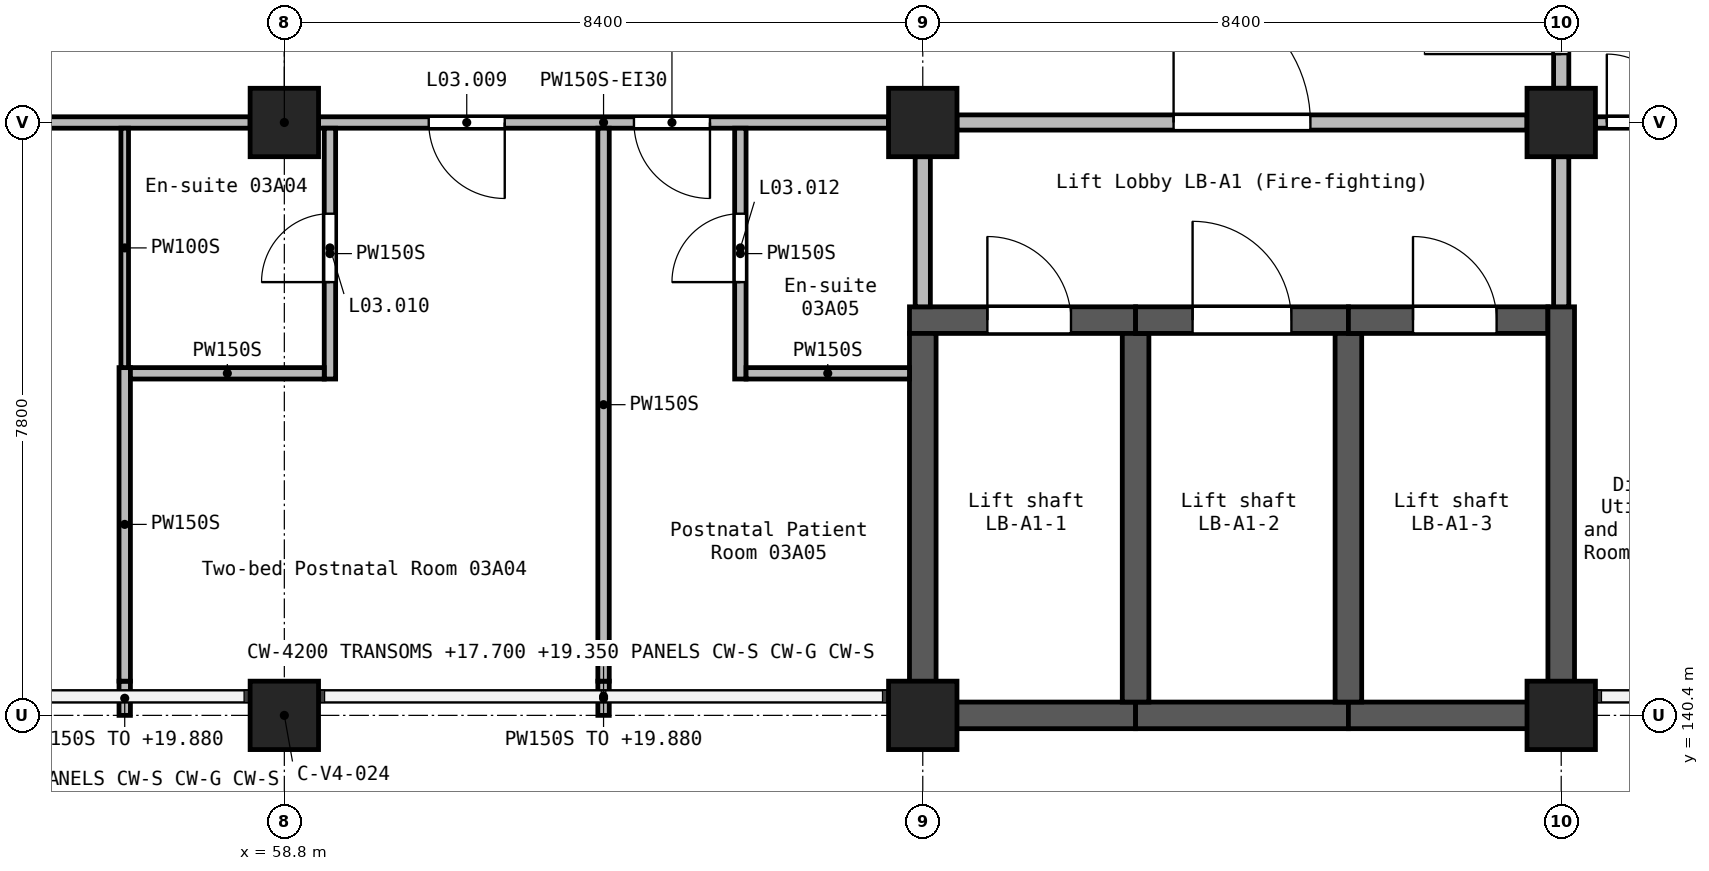
"""IFC4 building model, lengths in metres.
Left out: names, types, materials, properties, quantities, classifications, styles, units other than length and angle.
Written with IfcOpenShell. Run it as: python <this file> out.ifc"""

import sys

from ifc_helpers import new_model, si_unit, direction, frame, frame_2d, origin, origin_2d, place, context, subcontext, project, spatial, rectangle, extrude, element, fill, save


model = new_model("IFC4")
c1 = context("Model", 3, precision=1e-05, world=origin(), true_north=direction((0.0, 1.0)))
c2 = subcontext(c1, "Body", "Model", "MODEL_VIEW")
j1 = project(units=[si_unit("LENGTHUNIT", "METRE"), si_unit("PLANEANGLEUNIT", "RADIAN")], contexts=[c1])
p1 = place(None, origin())
s1 = spatial("IfcSite", under=j1, at=p1, CompositionType="ELEMENT")
p2 = place(p1, origin())
s2 = spatial("IfcBuilding", under=s1, at=p2, CompositionType="ELEMENT")
p3 = place(p2, frame((0.0, 0.0, 16.8)))
s3 = spatial("IfcBuildingStorey", under=s2, at=p3, CompositionType="ELEMENT", Elevation=16.8)
for number, where, z_axis, x_axis in (
    (1, (58.8, 140.4, 0.0), (0.0, 0.0, 1.0), (1.0, 0.0, 0.0)),
    (2, (58.8, 148.2, 0.0), (0.0, 0.0, 1.0), (1.0, 0.0, 0.0)),
    (3, (67.2, 140.4, 0.0), (0.0, 0.0, 1.0), (1.0, 0.0, 0.0)),
    (4, (67.2, 148.2, 0.0), (0.0, 0.0, 1.0), (1.0, 0.0, 0.0)),
    (5, (75.6, 140.4, 0.0), (0.0, 0.0, 1.0), (1.0, 0.0, 0.0)),
    (6, (75.6, 148.2, 0.0), (0.0, 0.0, 1.0), (1.0, 0.0, 0.0)),
):
    element("IfcColumn", number, at=place(p3, frame(where, z_axis=z_axis, x_axis=x_axis)), inside=s3, PredefinedType="COLUMN", context=c2, shape_type="SweptSolid", body=[
        extrude(rectangle(XDim=0.9, YDim=0.9, at=origin_2d()), origin(), (0.0, 0.0, 1.0), 4.2),
    ])
p4 = place(p3, frame((67.025, 145.6, 0.0), z_axis=(0.0, 0.0, 1.0), x_axis=(1.0, 0.0, 0.0)))
e7 = element("IfcWall", 7, at=p4, inside=s3, PredefinedType="SHEAR", context=c2, shape_type="SweptSolid", body=[
    extrude(rectangle(XDim=2.975, YDim=0.35, at=frame_2d((1.488, 0.0))), origin(), (0.0, 0.0, 1.0), 4.2),
])
p5 = place(p4, frame((1.025, 0.0, 0.0)))
e8 = element("IfcOpeningElement", 8, at=p5, cuts=e7, PredefinedType="OPENING", context=c2, shape_type="SweptSolid", body=[
    extrude(rectangle(XDim=1.1, YDim=2.1, at=frame_2d((0.55, 1.05))), frame((0.0, 0.185, 0.0), z_axis=(0.0, -1.0, 0.0), x_axis=(1.0, 0.0, 0.0)), (0.0, 0.0, 1.0), 0.37),
])
p6 = place(p3, frame((67.2, 140.225, 0.0), z_axis=(0.0, 0.0, 1.0), x_axis=(0.0, 1.0, 0.0)))
e9 = element("IfcWall", 9, at=p6, inside=s3, PredefinedType="SHEAR", context=c2, shape_type="SweptSolid", body=[
    extrude(rectangle(XDim=5.2, YDim=0.35, at=frame_2d((2.6, 0.0))), origin(), (0.0, 0.0, 1.0), 4.2),
])
p7 = place(p3, frame((67.375, 140.4, 0.0), z_axis=(0.0, 0.0, 1.0), x_axis=(1.0, 0.0, 0.0)))
e10 = element("IfcWall", 10, at=p7, inside=s3, PredefinedType="SHEAR", context=c2, shape_type="SweptSolid", body=[
    extrude(rectangle(XDim=2.625, YDim=0.35, at=frame_2d((1.312, 0.0))), origin(), (0.0, 0.0, 1.0), 4.2),
])
p8 = place(p3, frame((70.0, 140.4, 0.0), z_axis=(0.0, 0.0, 1.0), x_axis=(1.0, 0.0, 0.0)))
e11 = element("IfcWall", 11, at=p8, inside=s3, PredefinedType="SHEAR", context=c2, shape_type="SweptSolid", body=[
    extrude(rectangle(XDim=2.8, YDim=0.35, at=frame_2d((1.4, 0.0))), origin(), (0.0, 0.0, 1.0), 4.2),
])
p9 = place(p3, frame((70.0, 140.575, 0.0), z_axis=(0.0, 0.0, 1.0), x_axis=(0.0, 1.0, 0.0)))
e12 = element("IfcWall", 12, at=p9, inside=s3, PredefinedType="SHEAR", context=c2, shape_type="SweptSolid", body=[
    extrude(rectangle(XDim=4.85, YDim=0.35, at=frame_2d((2.425, 0.0))), origin(), (0.0, 0.0, 1.0), 4.2),
])
p10 = place(p3, frame((70.0, 145.6, 0.0), z_axis=(0.0, 0.0, 1.0), x_axis=(1.0, 0.0, 0.0)))
e13 = element("IfcWall", 13, at=p10, inside=s3, PredefinedType="SHEAR", context=c2, shape_type="SweptSolid", body=[
    extrude(rectangle(XDim=2.8, YDim=0.35, at=frame_2d((1.4, 0.0))), origin(), (0.0, 0.0, 1.0), 4.2),
])
p11 = place(p10, frame((0.75, 0.0, 0.0)))
e14 = element("IfcOpeningElement", 14, at=p11, cuts=e13, PredefinedType="OPENING", context=c2, shape_type="SweptSolid", body=[
    extrude(rectangle(XDim=1.3, YDim=2.1, at=frame_2d((0.65, 1.05))), frame((0.0, 0.185, 0.0), z_axis=(0.0, -1.0, 0.0), x_axis=(1.0, 0.0, 0.0)), (0.0, 0.0, 1.0), 0.37),
])
p12 = place(p3, frame((72.8, 140.4, 0.0), z_axis=(0.0, 0.0, 1.0), x_axis=(1.0, 0.0, 0.0)))
e15 = element("IfcWall", 15, at=p12, inside=s3, PredefinedType="SHEAR", context=c2, shape_type="SweptSolid", body=[
    extrude(rectangle(XDim=2.625, YDim=0.35, at=frame_2d((1.312, 0.0))), origin(), (0.0, 0.0, 1.0), 4.2),
])
p13 = place(p3, frame((72.8, 140.575, 0.0), z_axis=(0.0, 0.0, 1.0), x_axis=(0.0, 1.0, 0.0)))
e16 = element("IfcWall", 16, at=p13, inside=s3, PredefinedType="SHEAR", context=c2, shape_type="SweptSolid", body=[
    extrude(rectangle(XDim=4.85, YDim=0.35, at=frame_2d((2.425, 0.0))), origin(), (0.0, 0.0, 1.0), 4.2),
])
p14 = place(p3, frame((72.8, 145.6, 0.0), z_axis=(0.0, 0.0, 1.0), x_axis=(1.0, 0.0, 0.0)))
e17 = element("IfcWall", 17, at=p14, inside=s3, PredefinedType="SHEAR", context=c2, shape_type="SweptSolid", body=[
    extrude(rectangle(XDim=2.625, YDim=0.35, at=frame_2d((1.312, 0.0))), origin(), (0.0, 0.0, 1.0), 4.2),
])
p15 = place(p14, frame((0.85, 0.0, 0.0)))
e18 = element("IfcOpeningElement", 18, at=p15, cuts=e17, PredefinedType="OPENING", context=c2, shape_type="SweptSolid", body=[
    extrude(rectangle(XDim=1.1, YDim=2.1, at=frame_2d((0.55, 1.05))), frame((0.0, 0.185, 0.0), z_axis=(0.0, -1.0, 0.0), x_axis=(1.0, 0.0, 0.0)), (0.0, 0.0, 1.0), 0.37),
])
p16 = place(p3, frame((75.6, 140.225, 0.0), z_axis=(0.0, 0.0, 1.0), x_axis=(0.0, 1.0, 0.0)))
e19 = element("IfcWall", 19, at=p16, inside=s3, PredefinedType="SHEAR", context=c2, shape_type="SweptSolid", body=[
    extrude(rectangle(XDim=5.55, YDim=0.35, at=frame_2d((2.775, 0.0))), origin(), (0.0, 0.0, 1.0), 4.2),
])
p17 = place(p3, frame((75.6, 145.775, 0.0), z_axis=(0.0, 0.0, 1.0), x_axis=(0.0, 1.0, 0.0)))
e20 = element("IfcWall", 20, at=p17, inside=s3, PredefinedType="SOLIDWALL", context=c2, shape_type="SweptSolid", body=[
    extrude(rectangle(XDim=1.975, YDim=0.2, at=frame_2d((0.988, 0.0))), origin(), (0.0, 0.0, 1.0), 3.9),
])
p18 = place(p3, frame((75.6, 148.65, 0.0), z_axis=(0.0, 0.0, 1.0), x_axis=(0.0, 1.0, 0.0)))
e21 = element("IfcWall", 21, at=p18, inside=s3, PredefinedType="SOLIDWALL", context=c2, shape_type="SweptSolid", body=[
    extrude(rectangle(XDim=2.7, YDim=0.2, at=frame_2d((1.35, 0.0))), origin(), (0.0, 0.0, 1.0), 3.9),
])
p19 = place(p18, frame((0.45, 0.0, 0.0)))
e22 = element("IfcOpeningElement", 22, at=p19, cuts=e21, PredefinedType="OPENING", context=c2, shape_type="SweptSolid", body=[
    extrude(rectangle(XDim=1.8, YDim=2.1, at=frame_2d((0.9, 1.05))), frame((0.0, 0.11, 0.0), z_axis=(0.0, -1.0, 0.0), x_axis=(1.0, 0.0, 0.0)), (0.0, 0.0, 1.0), 0.22),
])
p20 = place(p3, frame((67.65, 148.2, 0.0), z_axis=(0.0, 0.0, 1.0), x_axis=(1.0, 0.0, 0.0)))
e23 = element("IfcWall", 23, at=p20, inside=s3, PredefinedType="SOLIDWALL", context=c2, shape_type="SweptSolid", body=[
    extrude(rectangle(XDim=7.5, YDim=0.2, at=frame_2d((3.75, 0.0))), origin(), (0.0, 0.0, 1.0), 3.9),
])
p21 = place(p20, frame((2.85, 0.0, 0.0)))
e24 = element("IfcOpeningElement", 24, at=p21, cuts=e23, PredefinedType="OPENING", context=c2, shape_type="SweptSolid", body=[
    extrude(rectangle(XDim=1.8, YDim=2.1, at=frame_2d((0.9, 1.05))), frame((0.0, 0.11, 0.0), z_axis=(0.0, -1.0, 0.0), x_axis=(1.0, 0.0, 0.0)), (0.0, 0.0, 1.0), 0.22),
])
p22 = place(p3, frame((67.2, 145.775, 0.0), z_axis=(0.0, 0.0, 1.0), x_axis=(0.0, 1.0, 0.0)))
e25 = element("IfcWall", 25, at=p22, inside=s3, PredefinedType="SOLIDWALL", context=c2, shape_type="SweptSolid", body=[
    extrude(rectangle(XDim=1.975, YDim=0.2, at=frame_2d((0.988, 0.0))), origin(), (0.0, 0.0, 1.0), 3.9),
])
p23 = place(p3, frame((66.75, 148.2, 0.0), z_axis=(0.0, 0.0, 1.0), x_axis=(-1.0, 0.0, 0.0)))
e26 = element("IfcWall", 26, at=p23, inside=s3, PredefinedType="PARTITIONING", context=c2, shape_type="SweptSolid", body=[
    extrude(rectangle(XDim=7.5, YDim=0.15, at=frame_2d((3.75, 0.0))), origin(), (0.0, 0.0, 1.0), 3.9),
])
p24 = place(p23, frame((5.05, 0.0, 0.0)))
e27 = element("IfcOpeningElement", 27, at=p24, cuts=e26, PredefinedType="OPENING", context=c2, shape_type="SweptSolid", body=[
    extrude(rectangle(XDim=1.0, YDim=2.1, at=frame_2d((0.5, 1.05))), frame((0.0, 0.085, 0.0), z_axis=(0.0, -1.0, 0.0), x_axis=(1.0, 0.0, 0.0)), (0.0, 0.0, 1.0), 0.17),
])
p25 = place(p23, frame((2.35, 0.0, 0.0)))
e28 = element("IfcOpeningElement", 28, at=p25, cuts=e26, PredefinedType="OPENING", context=c2, shape_type="SweptSolid", body=[
    extrude(rectangle(XDim=1.0, YDim=2.1, at=frame_2d((0.5, 1.05))), frame((0.0, 0.085, 0.0), z_axis=(0.0, -1.0, 0.0), x_axis=(1.0, 0.0, 0.0)), (0.0, 0.0, 1.0), 0.17),
])
p26 = place(p3, frame((58.35, 148.2, 0.0), z_axis=(0.0, 0.0, 1.0), x_axis=(-1.0, 0.0, 0.0)))
e29 = element("IfcWall", 29, at=p26, inside=s3, PredefinedType="PARTITIONING", context=c2, shape_type="SweptSolid", body=[
    extrude(rectangle(XDim=7.5, YDim=0.15, at=frame_2d((3.75, 0.0))), origin(), (0.0, 0.0, 1.0), 3.9),
])
p27 = place(p26, frame((3.9, 0.0, 0.0)))
e30 = element("IfcOpeningElement", 30, at=p27, cuts=e29, PredefinedType="OPENING", context=c2, shape_type="SweptSolid", body=[
    extrude(rectangle(XDim=1.8, YDim=2.1, at=frame_2d((0.9, 1.05))), frame((0.0, 0.085, 0.0), z_axis=(0.0, -1.0, 0.0), x_axis=(1.0, 0.0, 0.0)), (0.0, 0.0, 1.0), 0.17),
])
p28 = place(p3, frame((76.05, 148.2, 0.0), z_axis=(0.0, 0.0, 1.0), x_axis=(1.0, 0.0, 0.0)))
e31 = element("IfcWall", 31, at=p28, inside=s3, PredefinedType="PARTITIONING", context=c2, shape_type="SweptSolid", body=[
    extrude(rectangle(XDim=1.575, YDim=0.15, at=frame_2d((0.788, 0.0))), origin(), (0.0, 0.0, 1.0), 3.9),
])
p29 = place(p28, frame((0.15, 0.0, 0.0)))
e32 = element("IfcOpeningElement", 32, at=p29, cuts=e31, PredefinedType="OPENING", context=c2, shape_type="SweptSolid", body=[
    extrude(rectangle(XDim=0.9, YDim=2.1, at=frame_2d((0.45, 1.05))), frame((0.0, 0.085, 0.0), z_axis=(0.0, -1.0, 0.0), x_axis=(1.0, 0.0, 0.0)), (0.0, 0.0, 1.0), 0.17),
])
p30 = place(p3, frame((63.0, 140.4, 0.0), z_axis=(0.0, 0.0, 1.0), x_axis=(0.0, 1.0, 0.0)))
e33 = element("IfcWall", 33, at=p30, inside=s3, PredefinedType="PARTITIONING", context=c2, shape_type="SweptSolid", body=[
    extrude(rectangle(XDim=0.45, YDim=0.15, at=frame_2d((0.225, 0.0))), origin(), (0.0, 0.0, 1.0), 3.08),
])
p31 = place(p3, frame((63.0, 140.85, 0.0), z_axis=(0.0, 0.0, 1.0), x_axis=(0.0, 1.0, 0.0)))
e34 = element("IfcWall", 34, at=p31, inside=s3, PredefinedType="PARTITIONING", context=c2, shape_type="SweptSolid", body=[
    extrude(rectangle(XDim=7.275, YDim=0.15, at=frame_2d((3.637, 0.0))), origin(), (0.0, 0.0, 1.0), 3.9),
])
p32 = place(p3, frame((56.7, 140.4, 0.0), z_axis=(0.0, 0.0, 1.0), x_axis=(0.0, 1.0, 0.0)))
e35 = element("IfcWall", 35, at=p32, inside=s3, PredefinedType="PARTITIONING", context=c2, shape_type="SweptSolid", body=[
    extrude(rectangle(XDim=0.45, YDim=0.15, at=frame_2d((0.225, 0.0))), origin(), (0.0, 0.0, 1.0), 3.08),
])
p33 = place(p3, frame((56.7, 140.85, 0.0), z_axis=(0.0, 0.0, 1.0), x_axis=(0.0, 1.0, 0.0)))
e36 = element("IfcWall", 36, at=p33, inside=s3, PredefinedType="PARTITIONING", context=c2, shape_type="SweptSolid", body=[
    extrude(rectangle(XDim=4.125, YDim=0.15, at=frame_2d((2.062, 0.0))), origin(), (0.0, 0.0, 1.0), 3.9),
])
p34 = place(p3, frame((59.4, 144.825, 0.0), z_axis=(0.0, 0.0, 1.0), x_axis=(0.0, 1.0, 0.0)))
e37 = element("IfcWall", 37, at=p34, inside=s3, PredefinedType="PARTITIONING", context=c2, shape_type="SweptSolid", body=[
    extrude(rectangle(XDim=3.3, YDim=0.15, at=frame_2d((1.65, 0.0))), origin(), (0.0, 0.0, 1.0), 3.9),
])
p35 = place(p34, frame((1.275, 0.0, 0.0)))
e38 = element("IfcOpeningElement", 38, at=p35, cuts=e37, PredefinedType="OPENING", context=c2, shape_type="SweptSolid", body=[
    extrude(rectangle(XDim=0.9, YDim=2.1, at=frame_2d((0.45, 1.05))), frame((0.0, 0.085, 0.0), z_axis=(0.0, -1.0, 0.0), x_axis=(1.0, 0.0, 0.0)), (0.0, 0.0, 1.0), 0.17),
])
p36 = place(p3, frame((64.8, 144.825, 0.0), z_axis=(0.0, 0.0, 1.0), x_axis=(0.0, 1.0, 0.0)))
e39 = element("IfcWall", 39, at=p36, inside=s3, PredefinedType="PARTITIONING", context=c2, shape_type="SweptSolid", body=[
    extrude(rectangle(XDim=3.3, YDim=0.15, at=frame_2d((1.65, 0.0))), origin(), (0.0, 0.0, 1.0), 3.9),
])
p37 = place(p36, frame((1.275, 0.0, 0.0)))
e40 = element("IfcOpeningElement", 40, at=p37, cuts=e39, PredefinedType="OPENING", context=c2, shape_type="SweptSolid", body=[
    extrude(rectangle(XDim=0.9, YDim=2.1, at=frame_2d((0.45, 1.05))), frame((0.0, 0.085, 0.0), z_axis=(0.0, -1.0, 0.0), x_axis=(1.0, 0.0, 0.0)), (0.0, 0.0, 1.0), 0.17),
])
p38 = place(p3, frame((56.775, 144.9, 0.0), z_axis=(0.0, 0.0, 1.0), x_axis=(1.0, 0.0, 0.0)))
e41 = element("IfcWall", 41, at=p38, inside=s3, PredefinedType="PARTITIONING", context=c2, shape_type="SweptSolid", body=[
    extrude(rectangle(XDim=2.55, YDim=0.15, at=frame_2d((1.275, 0.0))), origin(), (0.0, 0.0, 1.0), 3.9),
])
p39 = place(p3, frame((64.875, 144.9, 0.0), z_axis=(0.0, 0.0, 1.0), x_axis=(1.0, 0.0, 0.0)))
e42 = element("IfcWall", 42, at=p39, inside=s3, PredefinedType="PARTITIONING", context=c2, shape_type="SweptSolid", body=[
    extrude(rectangle(XDim=2.15, YDim=0.15, at=frame_2d((1.075, 0.0))), origin(), (0.0, 0.0, 1.0), 3.9),
])
p40 = place(p3, frame((56.7, 144.975, 0.0), z_axis=(0.0, 0.0, 1.0), x_axis=(0.0, 1.0, 0.0)))
e43 = element("IfcWall", 43, at=p40, inside=s3, PredefinedType="PARTITIONING", context=c2, shape_type="SweptSolid", body=[
    extrude(rectangle(XDim=3.15, YDim=0.1, at=frame_2d((1.575, 0.0))), origin(), (0.0, 0.0, 1.0), 3.9),
])
p41 = place(p19, frame((1.8, 0.0, 0.0), z_axis=(0.0, 0.0, 1.0), x_axis=(-1.0, 0.0, 0.0)))
e44 = element("IfcDoor", 44, at=p41, inside=s3, OperationType="DOUBLE_DOOR_SINGLE_SWING", PredefinedType="DOOR", context=c2, shape_type="SweptSolid", body=[
    extrude(rectangle(XDim=1.8, YDim=2.1, at=frame_2d((0.9, 1.05))), frame((0.0, 0.025, 0.0), z_axis=(0.0, -1.0, 0.0), x_axis=(1.0, 0.0, 0.0)), (0.0, 0.0, 1.0), 0.05),
])
fill(e22, e44)
p42 = place(p24, origin())
e45 = element("IfcDoor", 45, at=p42, inside=s3, OperationType="SINGLE_SWING_RIGHT", PredefinedType="DOOR", context=c2, shape_type="SweptSolid", body=[
    extrude(rectangle(XDim=1.0, YDim=2.1, at=frame_2d((0.5, 1.05))), frame((0.0, 0.025, 0.0), z_axis=(0.0, -1.0, 0.0), x_axis=(1.0, 0.0, 0.0)), (0.0, 0.0, 1.0), 0.05),
])
fill(e27, e45)
p43 = place(p35, origin())
e46 = element("IfcDoor", 46, at=p43, inside=s3, OperationType="SINGLE_SWING_RIGHT", PredefinedType="DOOR", context=c2, shape_type="SweptSolid", body=[
    extrude(rectangle(XDim=0.9, YDim=2.1, at=frame_2d((0.45, 1.05))), frame((0.0, 0.025, 0.0), z_axis=(0.0, -1.0, 0.0), x_axis=(1.0, 0.0, 0.0)), (0.0, 0.0, 1.0), 0.05),
])
fill(e38, e46)
p44 = place(p25, origin())
e47 = element("IfcDoor", 47, at=p44, inside=s3, OperationType="SINGLE_SWING_LEFT", PredefinedType="DOOR", context=c2, shape_type="SweptSolid", body=[
    extrude(rectangle(XDim=1.0, YDim=2.1, at=frame_2d((0.5, 1.05))), frame((0.0, 0.025, 0.0), z_axis=(0.0, -1.0, 0.0), x_axis=(1.0, 0.0, 0.0)), (0.0, 0.0, 1.0), 0.05),
])
fill(e28, e47)
p45 = place(p37, frame((0.9, 0.0, 0.0), z_axis=(0.0, 0.0, 1.0), x_axis=(-1.0, 0.0, 0.0)))
e48 = element("IfcDoor", 48, at=p45, inside=s3, OperationType="SINGLE_SWING_LEFT", PredefinedType="DOOR", context=c2, shape_type="SweptSolid", body=[
    extrude(rectangle(XDim=0.9, YDim=2.1, at=frame_2d((0.45, 1.05))), frame((0.0, 0.025, 0.0), z_axis=(0.0, -1.0, 0.0), x_axis=(1.0, 0.0, 0.0)), (0.0, 0.0, 1.0), 0.05),
])
fill(e40, e48)
p46 = place(p29, frame((0.9, 0.0, 0.0), z_axis=(0.0, 0.0, 1.0), x_axis=(-1.0, 0.0, 0.0)))
e49 = element("IfcDoor", 49, at=p46, inside=s3, OperationType="SINGLE_SWING_RIGHT", PredefinedType="DOOR", context=c2, shape_type="SweptSolid", body=[
    extrude(rectangle(XDim=0.9, YDim=2.1, at=frame_2d((0.45, 1.05))), frame((0.0, 0.025, 0.0), z_axis=(0.0, -1.0, 0.0), x_axis=(1.0, 0.0, 0.0)), (0.0, 0.0, 1.0), 0.05),
])
fill(e32, e49)
p47 = place(p21, frame((1.8, 0.0, 0.0), z_axis=(0.0, 0.0, 1.0), x_axis=(-1.0, 0.0, 0.0)))
e50 = element("IfcDoor", 50, at=p47, inside=s3, OperationType="DOUBLE_DOOR_SINGLE_SWING", PredefinedType="DOOR", context=c2, shape_type="SweptSolid", body=[
    extrude(rectangle(XDim=1.8, YDim=2.1, at=frame_2d((0.9, 1.05))), frame((0.0, 0.025, 0.0), z_axis=(0.0, -1.0, 0.0), x_axis=(1.0, 0.0, 0.0)), (0.0, 0.0, 1.0), 0.05),
])
fill(e24, e50)
p48 = place(p5, origin())
e51 = element("IfcDoor", 51, at=p48, inside=s3, OperationType="DOUBLE_DOOR_SLIDING", PredefinedType="DOOR", context=c2, shape_type="SweptSolid", body=[
    extrude(rectangle(XDim=1.1, YDim=2.1, at=frame_2d((0.55, 1.05))), frame((0.0, 0.025, 0.0), z_axis=(0.0, -1.0, 0.0), x_axis=(1.0, 0.0, 0.0)), (0.0, 0.0, 1.0), 0.05),
])
fill(e8, e51)
p49 = place(p11, origin())
e52 = element("IfcDoor", 52, at=p49, inside=s3, OperationType="DOUBLE_DOOR_SLIDING", PredefinedType="DOOR", context=c2, shape_type="SweptSolid", body=[
    extrude(rectangle(XDim=1.3, YDim=2.1, at=frame_2d((0.65, 1.05))), frame((0.0, 0.025, 0.0), z_axis=(0.0, -1.0, 0.0), x_axis=(1.0, 0.0, 0.0)), (0.0, 0.0, 1.0), 0.05),
])
fill(e14, e52)
p50 = place(p15, origin())
e53 = element("IfcDoor", 53, at=p50, inside=s3, OperationType="DOUBLE_DOOR_SLIDING", PredefinedType="DOOR", context=c2, shape_type="SweptSolid", body=[
    extrude(rectangle(XDim=1.1, YDim=2.1, at=frame_2d((0.55, 1.05))), frame((0.0, 0.025, 0.0), z_axis=(0.0, -1.0, 0.0), x_axis=(1.0, 0.0, 0.0)), (0.0, 0.0, 1.0), 0.05),
])
fill(e18, e53)
save(model, sys.argv[1])
